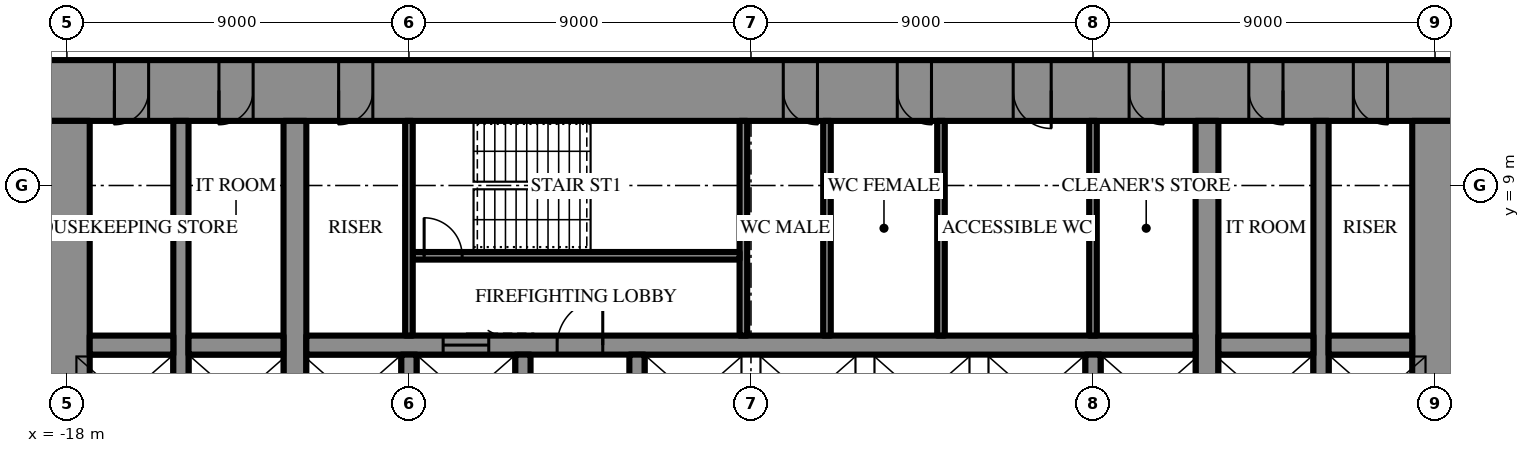
"""IFC4 building model, lengths in metres.
Left out: names, types, materials, properties, quantities, classifications, styles, units other than length and angle.
Written with IfcOpenShell. Run it as: python <this file> out.ifc"""

import sys

from ifc_helpers import new_model, si_unit, direction, frame, frame_2d, origin, place, context, subcontext, project, spatial, rectangle, extrude, element, fill, save


model = new_model("IFC4")
c1 = context("Model", 3, precision=1e-05, world=origin(), true_north=direction((0.0, 1.0)))
c2 = subcontext(c1, "Body", "Model", "MODEL_VIEW")
j1 = project(units=[si_unit("LENGTHUNIT", "METRE"), si_unit("PLANEANGLEUNIT", "RADIAN")], contexts=[c1])
p1 = place(None, origin())
s1 = spatial("IfcSite", under=j1, at=p1, CompositionType="ELEMENT")
p2 = place(p1, origin())
s2 = spatial("IfcBuilding", under=s1, at=p2, CompositionType="ELEMENT")
p3 = place(p2, frame((0.0, 0.0, 73.9)))
s3 = spatial("IfcBuildingStorey", under=s2, at=p3, CompositionType="ELEMENT", Elevation=73.9)
p4 = place(p3, frame((-18.6, 11.5, 0.0), z_axis=(0.0, 0.0, 1.0), x_axis=(1.0, 0.0, 0.0)))
e1 = element("IfcWall", 1, at=p4, inside=s3, PredefinedType="SHEAR", context=c2, shape_type="SweptSolid", body=[
    extrude(rectangle(XDim=37.2, YDim=1.6, at=frame_2d((18.6, 0.0))), origin(), (0.0, 0.0, 1.0), 4.2),
])
p5 = place(p4, frame((19.45, 0.0, 0.0)))
e2 = element("IfcOpeningElement", 2, at=p5, cuts=e1, PredefinedType="OPENING", context=c2, shape_type="SweptSolid", body=[
    extrude(rectangle(XDim=0.9, YDim=2.2, at=frame_2d((0.45, 1.1))), frame((0.0, 0.81, 0.0), z_axis=(0.0, -1.0, 0.0), x_axis=(1.0, 0.0, 0.0)), (0.0, 0.0, 1.0), 1.62),
])
p6 = place(p4, frame((22.45, 0.0, 0.0)))
e3 = element("IfcOpeningElement", 3, at=p6, cuts=e1, PredefinedType="OPENING", context=c2, shape_type="SweptSolid", body=[
    extrude(rectangle(XDim=0.9, YDim=2.2, at=frame_2d((0.45, 1.1))), frame((0.0, 0.81, 0.0), z_axis=(0.0, -1.0, 0.0), x_axis=(1.0, 0.0, 0.0)), (0.0, 0.0, 1.0), 1.62),
])
p7 = place(p4, frame((25.5, 0.0, 0.0)))
e4 = element("IfcOpeningElement", 4, at=p7, cuts=e1, PredefinedType="OPENING", context=c2, shape_type="SweptSolid", body=[
    extrude(rectangle(XDim=1.0, YDim=2.2, at=frame_2d((0.5, 1.1))), frame((0.0, 0.81, 0.0), z_axis=(0.0, -1.0, 0.0), x_axis=(1.0, 0.0, 0.0)), (0.0, 0.0, 1.0), 1.62),
])
p8 = place(p4, frame((1.85, 0.0, 0.0)))
e5 = element("IfcOpeningElement", 5, at=p8, cuts=e1, PredefinedType="OPENING", context=c2, shape_type="SweptSolid", body=[
    extrude(rectangle(XDim=0.9, YDim=2.2, at=frame_2d((0.45, 1.1))), frame((0.0, 0.81, 0.0), z_axis=(0.0, -1.0, 0.0), x_axis=(1.0, 0.0, 0.0)), (0.0, 0.0, 1.0), 1.62),
])
p9 = place(p4, frame((4.6, 0.0, 0.0)))
e6 = element("IfcOpeningElement", 6, at=p9, cuts=e1, PredefinedType="OPENING", context=c2, shape_type="SweptSolid", body=[
    extrude(rectangle(XDim=0.9, YDim=2.2, at=frame_2d((0.45, 1.1))), frame((0.0, 0.81, 0.0), z_axis=(0.0, -1.0, 0.0), x_axis=(1.0, 0.0, 0.0)), (0.0, 0.0, 1.0), 1.62),
])
p10 = place(p4, frame((7.75, 0.0, 0.0)))
e7 = element("IfcOpeningElement", 7, at=p10, cuts=e1, PredefinedType="OPENING", context=c2, shape_type="SweptSolid", body=[
    extrude(rectangle(XDim=0.9, YDim=2.2, at=frame_2d((0.45, 1.1))), frame((0.0, 0.81, 0.0), z_axis=(0.0, -1.0, 0.0), x_axis=(1.0, 0.0, 0.0)), (0.0, 0.0, 1.0), 1.62),
])
p11 = place(p4, frame((28.55, 0.0, 0.0)))
e8 = element("IfcOpeningElement", 8, at=p11, cuts=e1, PredefinedType="OPENING", context=c2, shape_type="SweptSolid", body=[
    extrude(rectangle(XDim=0.9, YDim=2.2, at=frame_2d((0.45, 1.1))), frame((0.0, 0.81, 0.0), z_axis=(0.0, -1.0, 0.0), x_axis=(1.0, 0.0, 0.0)), (0.0, 0.0, 1.0), 1.62),
])
p12 = place(p4, frame((31.7, 0.0, 0.0)))
e9 = element("IfcOpeningElement", 9, at=p12, cuts=e1, PredefinedType="OPENING", context=c2, shape_type="SweptSolid", body=[
    extrude(rectangle(XDim=0.9, YDim=2.2, at=frame_2d((0.45, 1.1))), frame((0.0, 0.81, 0.0), z_axis=(0.0, -1.0, 0.0), x_axis=(1.0, 0.0, 0.0)), (0.0, 0.0, 1.0), 1.62),
])
p13 = place(p4, frame((34.45, 0.0, 0.0)))
e10 = element("IfcOpeningElement", 10, at=p13, cuts=e1, PredefinedType="OPENING", context=c2, shape_type="SweptSolid", body=[
    extrude(rectangle(XDim=0.9, YDim=2.2, at=frame_2d((0.45, 1.1))), frame((0.0, 0.81, 0.0), z_axis=(0.0, -1.0, 0.0), x_axis=(1.0, 0.0, 0.0)), (0.0, 0.0, 1.0), 1.62),
])
p14 = place(p3, frame((18.0, -10.7, 0.0), z_axis=(0.0, 0.0, 1.0), x_axis=(0.0, 1.0, 0.0)))
e11 = element("IfcWall", 11, at=p14, inside=s3, PredefinedType="SHEAR", context=c2, shape_type="SweptSolid", body=[
    extrude(rectangle(XDim=21.4, YDim=1.2, at=frame_2d((10.7, 0.0))), origin(), (0.0, 0.0, 1.0), 4.2),
])
p15 = place(p14, frame((9.8, 0.0, 0.0)))
e12 = element("IfcOpeningElement", 12, at=p15, cuts=e11, PredefinedType="OPENING", context=c2, shape_type="SweptSolid", body=[
    extrude(rectangle(XDim=1.8, YDim=2.4, at=frame_2d((0.9, 1.2))), frame((0.0, 0.61, 0.0), z_axis=(0.0, -1.0, 0.0), x_axis=(1.0, 0.0, 0.0)), (0.0, 0.0, 1.0), 1.22),
])
p16 = place(p3, frame((-18.0, 10.7, 0.0), z_axis=(0.0, 0.0, 1.0), x_axis=(0.0, -1.0, 0.0)))
e13 = element("IfcWall", 13, at=p16, inside=s3, PredefinedType="SHEAR", context=c2, shape_type="SweptSolid", body=[
    extrude(rectangle(XDim=21.4, YDim=1.2, at=frame_2d((10.7, 0.0))), origin(), (0.0, 0.0, 1.0), 4.2),
])
p17 = place(p16, frame((9.8, 0.0, 0.0)))
e14 = element("IfcOpeningElement", 14, at=p17, cuts=e13, PredefinedType="OPENING", context=c2, shape_type="SweptSolid", body=[
    extrude(rectangle(XDim=1.8, YDim=2.4, at=frame_2d((0.9, 1.2))), frame((0.0, 0.61, 0.0), z_axis=(0.0, -1.0, 0.0), x_axis=(1.0, 0.0, 0.0)), (0.0, 0.0, 1.0), 1.22),
])
p18 = place(p3, frame((12.0, -10.7, 0.0), z_axis=(0.0, 0.0, 1.0), x_axis=(0.0, 1.0, 0.0)))
e15 = element("IfcWall", 15, at=p18, inside=s3, PredefinedType="SHEAR", context=c2, shape_type="SweptSolid", body=[
    extrude(rectangle(XDim=21.4, YDim=0.6, at=frame_2d((10.7, 0.0))), origin(), (0.0, 0.0, 1.0), 4.2),
])
p19 = place(p18, frame((9.8, 0.0, 0.0)))
e16 = element("IfcOpeningElement", 16, at=p19, cuts=e15, PredefinedType="OPENING", context=c2, shape_type="SweptSolid", body=[
    extrude(rectangle(XDim=1.8, YDim=2.4, at=frame_2d((0.9, 1.2))), frame((0.0, 0.31, 0.0), z_axis=(0.0, -1.0, 0.0), x_axis=(1.0, 0.0, 0.0)), (0.0, 0.0, 1.0), 0.62),
])
p20 = place(p3, frame((-12.0, -10.7, 0.0), z_axis=(0.0, 0.0, 1.0), x_axis=(0.0, 1.0, 0.0)))
e17 = element("IfcWall", 17, at=p20, inside=s3, PredefinedType="SHEAR", context=c2, shape_type="SweptSolid", body=[
    extrude(rectangle(XDim=21.4, YDim=0.6, at=frame_2d((10.7, 0.0))), origin(), (0.0, 0.0, 1.0), 4.2),
])
p21 = place(p20, frame((9.8, 0.0, 0.0)))
e18 = element("IfcOpeningElement", 18, at=p21, cuts=e17, PredefinedType="OPENING", context=c2, shape_type="SweptSolid", body=[
    extrude(rectangle(XDim=1.8, YDim=2.4, at=frame_2d((0.9, 1.2))), frame((0.0, 0.31, 0.0), z_axis=(0.0, -1.0, 0.0), x_axis=(1.0, 0.0, 0.0)), (0.0, 0.0, 1.0), 0.62),
])
p22 = place(p3, frame((15.0, -10.7, 0.0), z_axis=(0.0, 0.0, 1.0), x_axis=(0.0, 1.0, 0.0)))
e19 = element("IfcWall", 19, at=p22, inside=s3, PredefinedType="SHEAR", context=c2, shape_type="SweptSolid", body=[
    extrude(rectangle(XDim=21.4, YDim=0.4, at=frame_2d((10.7, 0.0))), origin(), (0.0, 0.0, 1.0), 4.2),
])
p23 = place(p22, frame((9.8, 0.0, 0.0)))
e20 = element("IfcOpeningElement", 20, at=p23, cuts=e19, PredefinedType="OPENING", context=c2, shape_type="SweptSolid", body=[
    extrude(rectangle(XDim=1.8, YDim=2.4, at=frame_2d((0.9, 1.2))), frame((0.0, 0.21, 0.0), z_axis=(0.0, -1.0, 0.0), x_axis=(1.0, 0.0, 0.0)), (0.0, 0.0, 1.0), 0.42),
])
p24 = place(p3, frame((-15.0, -10.7, 0.0), z_axis=(0.0, 0.0, 1.0), x_axis=(0.0, 1.0, 0.0)))
e21 = element("IfcWall", 21, at=p24, inside=s3, PredefinedType="SHEAR", context=c2, shape_type="SweptSolid", body=[
    extrude(rectangle(XDim=21.4, YDim=0.4, at=frame_2d((10.7, 0.0))), origin(), (0.0, 0.0, 1.0), 4.2),
])
p25 = place(p24, frame((9.8, 0.0, 0.0)))
e22 = element("IfcOpeningElement", 22, at=p25, cuts=e21, PredefinedType="OPENING", context=c2, shape_type="SweptSolid", body=[
    extrude(rectangle(XDim=1.8, YDim=2.4, at=frame_2d((0.9, 1.2))), frame((0.0, 0.21, 0.0), z_axis=(0.0, -1.0, 0.0), x_axis=(1.0, 0.0, 0.0)), (0.0, 0.0, 1.0), 0.42),
])
p26 = place(p3, frame((-17.4, 4.8, 0.0), z_axis=(0.0, 0.0, 1.0), x_axis=(1.0, 0.0, 0.0)))
e23 = element("IfcWall", 23, at=p26, inside=s3, PredefinedType="SHEAR", context=c2, shape_type="SweptSolid", body=[
    extrude(rectangle(XDim=2.2, YDim=0.5, at=frame_2d((1.1, 0.0))), origin(), (0.0, 0.0, 1.0), 4.2),
])
p27 = place(p3, frame((-14.8, 4.8, 0.0), z_axis=(0.0, 0.0, 1.0), x_axis=(1.0, 0.0, 0.0)))
e24 = element("IfcWall", 24, at=p27, inside=s3, PredefinedType="SHEAR", context=c2, shape_type="SweptSolid", body=[
    extrude(rectangle(XDim=2.5, YDim=0.5, at=frame_2d((1.25, 0.0))), origin(), (0.0, 0.0, 1.0), 4.2),
])
p28 = place(p3, frame((-11.7, 4.8, 0.0), z_axis=(0.0, 0.0, 1.0), x_axis=(1.0, 0.0, 0.0)))
e25 = element("IfcWall", 25, at=p28, inside=s3, PredefinedType="SHEAR", context=c2, shape_type="SweptSolid", body=[
    extrude(rectangle(XDim=23.4, YDim=0.5, at=frame_2d((11.7, 0.0))), origin(), (0.0, 0.0, 1.0), 4.2),
])
p29 = place(p28, frame((6.6, 0.0, 0.0)))
e26 = element("IfcOpeningElement", 26, at=p29, cuts=e25, PredefinedType="OPENING", context=c2, shape_type="SweptSolid", body=[
    extrude(rectangle(XDim=1.2, YDim=2.2, at=frame_2d((0.6, 1.1))), frame((0.0, 0.26, 0.0), z_axis=(0.0, -1.0, 0.0), x_axis=(1.0, 0.0, 0.0)), (0.0, 0.0, 1.0), 0.52),
])
p30 = place(p28, frame((3.6, 0.0, 0.0)))
e27 = element("IfcOpeningElement", 27, at=p30, cuts=e25, PredefinedType="OPENING", context=c2, shape_type="SweptSolid", body=[
    extrude(rectangle(XDim=1.2, YDim=2.2, at=frame_2d((0.6, 1.1))), frame((0.0, 0.26, 0.0), z_axis=(0.0, -1.0, 0.0), x_axis=(1.0, 0.0, 0.0)), (0.0, 0.0, 1.0), 0.52),
])
p31 = place(p3, frame((12.3, 4.8, 0.0), z_axis=(0.0, 0.0, 1.0), x_axis=(1.0, 0.0, 0.0)))
e28 = element("IfcWall", 28, at=p31, inside=s3, PredefinedType="SHEAR", context=c2, shape_type="SweptSolid", body=[
    extrude(rectangle(XDim=2.5, YDim=0.5, at=frame_2d((1.25, 0.0))), origin(), (0.0, 0.0, 1.0), 4.2),
])
p32 = place(p3, frame((15.2, 4.8, 0.0), z_axis=(0.0, 0.0, 1.0), x_axis=(1.0, 0.0, 0.0)))
e29 = element("IfcWall", 29, at=p32, inside=s3, PredefinedType="SHEAR", context=c2, shape_type="SweptSolid", body=[
    extrude(rectangle(XDim=2.2, YDim=0.5, at=frame_2d((1.1, 0.0))), origin(), (0.0, 0.0, 1.0), 4.2),
])
for number, where, z_axis, x_axis in (
    (30, (-9.0, 2.25, 0.0), (0.0, 0.0, 1.0), (0.0, 1.0, 0.0)),
    (31, (-6.0, 2.25, 0.0), (0.0, 0.0, 1.0), (0.0, 1.0, 0.0)),
    (32, (-3.0, 2.25, 0.0), (0.0, 0.0, 1.0), (0.0, 1.0, 0.0)),
    (33, (9.0, 2.25, 0.0), (0.0, 0.0, 1.0), (0.0, 1.0, 0.0)),
):
    element("IfcWall", number, at=place(p3, frame(where, z_axis=z_axis, x_axis=x_axis)), inside=s3, PredefinedType="SHEAR", context=c2, shape_type="SweptSolid", body=[
        extrude(rectangle(XDim=2.3, YDim=0.4, at=frame_2d((1.15, 0.0))), origin(), (0.0, 0.0, 1.0), 4.2),
    ])
p33 = place(p3, frame((-0.2, 5.05, 0.0), z_axis=(0.0, 0.0, 1.0), x_axis=(0.0, 1.0, 0.0)))
e34 = element("IfcWall", 34, at=p33, inside=s3, PredefinedType="SHEAR", context=c2, shape_type="SweptSolid", body=[
    extrude(rectangle(XDim=5.65, YDim=0.2, at=frame_2d((2.825, 0.0))), origin(), (0.0, 0.0, 1.0), 4.2),
])
p34 = place(p3, frame((-8.9, 7.15, 0.0), z_axis=(0.0, 0.0, 1.0), x_axis=(1.0, 0.0, 0.0)))
e35 = element("IfcWall", 35, at=p34, inside=s3, PredefinedType="SHEAR", context=c2, shape_type="SweptSolid", body=[
    extrude(rectangle(XDim=8.6, YDim=0.2, at=frame_2d((4.3, 0.0))), origin(), (0.0, 0.0, 1.0), 4.2),
])
p35 = place(p34, frame((0.3, 0.0, 0.0)))
e36 = element("IfcOpeningElement", 36, at=p35, cuts=e35, PredefinedType="OPENING", context=c2, shape_type="SweptSolid", body=[
    extrude(rectangle(XDim=1.0, YDim=2.2, at=frame_2d((0.5, 1.1))), frame((0.0, 0.11, 0.0), z_axis=(0.0, -1.0, 0.0), x_axis=(1.0, 0.0, 0.0)), (0.0, 0.0, 1.0), 0.22),
])
for number, where, z_axis, x_axis in (
    (37, (-9.0, 5.05, 0.0), (0.0, 0.0, 1.0), (0.0, 1.0, 0.0)),
    (38, (9.0, 5.05, 0.0), (0.0, 0.0, 1.0), (0.0, 1.0, 0.0)),
    (39, (2.0, 5.05, 0.0), (0.0, 0.0, 1.0), (0.0, 1.0, 0.0)),
    (40, (5.0, 5.05, 0.0), (0.0, 0.0, 1.0), (0.0, 1.0, 0.0)),
):
    element("IfcWall", number, at=place(p3, frame(where, z_axis=z_axis, x_axis=x_axis)), inside=s3, PredefinedType="PARTITIONING", context=c2, shape_type="SweptSolid", body=[
        extrude(rectangle(XDim=5.65, YDim=0.2, at=frame_2d((2.825, 0.0))), origin(), (0.0, 0.0, 1.0), 4.0),
    ])
p36 = place(p29, origin())
e41 = element("IfcDoor", 41, at=p36, inside=s3, OperationType="SINGLE_SWING_LEFT", PredefinedType="DOOR", context=c2, shape_type="SweptSolid", body=[
    extrude(rectangle(XDim=1.2, YDim=2.2, at=frame_2d((0.6, 1.1))), frame((0.0, 0.025, 0.0), z_axis=(0.0, -1.0, 0.0), x_axis=(1.0, 0.0, 0.0)), (0.0, 0.0, 1.0), 0.05),
])
fill(e26, e41)
p37 = place(p35, origin())
e42 = element("IfcDoor", 42, at=p37, inside=s3, OperationType="SINGLE_SWING_RIGHT", PredefinedType="DOOR", context=c2, shape_type="SweptSolid", body=[
    extrude(rectangle(XDim=1.0, YDim=2.2, at=frame_2d((0.5, 1.1))), frame((0.0, 0.025, 0.0), z_axis=(0.0, -1.0, 0.0), x_axis=(1.0, 0.0, 0.0)), (0.0, 0.0, 1.0), 0.05),
])
fill(e36, e42)
p38 = place(p5, frame((0.9, 0.0, 0.0), z_axis=(0.0, 0.0, 1.0), x_axis=(-1.0, 0.0, 0.0)))
e43 = element("IfcDoor", 43, at=p38, inside=s3, OperationType="SINGLE_SWING_RIGHT", PredefinedType="DOOR", context=c2, shape_type="SweptSolid", body=[
    extrude(rectangle(XDim=0.9, YDim=2.2, at=frame_2d((0.45, 1.1))), frame((0.0, 0.025, 0.0), z_axis=(0.0, -1.0, 0.0), x_axis=(1.0, 0.0, 0.0)), (0.0, 0.0, 1.0), 0.05),
])
fill(e2, e43)
p39 = place(p6, frame((0.9, 0.0, 0.0), z_axis=(0.0, 0.0, 1.0), x_axis=(-1.0, 0.0, 0.0)))
e44 = element("IfcDoor", 44, at=p39, inside=s3, OperationType="SINGLE_SWING_RIGHT", PredefinedType="DOOR", context=c2, shape_type="SweptSolid", body=[
    extrude(rectangle(XDim=0.9, YDim=2.2, at=frame_2d((0.45, 1.1))), frame((0.0, 0.025, 0.0), z_axis=(0.0, -1.0, 0.0), x_axis=(1.0, 0.0, 0.0)), (0.0, 0.0, 1.0), 0.05),
])
fill(e3, e44)
p40 = place(p7, frame((1.0, 0.0, 0.0), z_axis=(0.0, 0.0, 1.0), x_axis=(-1.0, 0.0, 0.0)))
e45 = element("IfcDoor", 45, at=p40, inside=s3, OperationType="SINGLE_SWING_RIGHT", PredefinedType="DOOR", context=c2, shape_type="SweptSolid", body=[
    extrude(rectangle(XDim=1.0, YDim=2.2, at=frame_2d((0.5, 1.1))), frame((0.0, 0.025, 0.0), z_axis=(0.0, -1.0, 0.0), x_axis=(1.0, 0.0, 0.0)), (0.0, 0.0, 1.0), 0.05),
])
fill(e4, e45)
p41 = place(p8, frame((0.9, 0.0, 0.0), z_axis=(0.0, 0.0, 1.0), x_axis=(-1.0, 0.0, 0.0)))
e46 = element("IfcDoor", 46, at=p41, inside=s3, OperationType="SINGLE_SWING_LEFT", PredefinedType="DOOR", context=c2, shape_type="SweptSolid", body=[
    extrude(rectangle(XDim=0.9, YDim=2.2, at=frame_2d((0.45, 1.1))), frame((0.0, 0.025, 0.0), z_axis=(0.0, -1.0, 0.0), x_axis=(1.0, 0.0, 0.0)), (0.0, 0.0, 1.0), 0.05),
])
fill(e5, e46)
p42 = place(p9, frame((0.9, 0.0, 0.0), z_axis=(0.0, 0.0, 1.0), x_axis=(-1.0, 0.0, 0.0)))
e47 = element("IfcDoor", 47, at=p42, inside=s3, OperationType="SINGLE_SWING_LEFT", PredefinedType="DOOR", context=c2, shape_type="SweptSolid", body=[
    extrude(rectangle(XDim=0.9, YDim=2.2, at=frame_2d((0.45, 1.1))), frame((0.0, 0.025, 0.0), z_axis=(0.0, -1.0, 0.0), x_axis=(1.0, 0.0, 0.0)), (0.0, 0.0, 1.0), 0.05),
])
fill(e6, e47)
p43 = place(p10, frame((0.9, 0.0, 0.0), z_axis=(0.0, 0.0, 1.0), x_axis=(-1.0, 0.0, 0.0)))
e48 = element("IfcDoor", 48, at=p43, inside=s3, OperationType="SINGLE_SWING_LEFT", PredefinedType="DOOR", context=c2, shape_type="SweptSolid", body=[
    extrude(rectangle(XDim=0.9, YDim=2.2, at=frame_2d((0.45, 1.1))), frame((0.0, 0.025, 0.0), z_axis=(0.0, -1.0, 0.0), x_axis=(1.0, 0.0, 0.0)), (0.0, 0.0, 1.0), 0.05),
])
fill(e7, e48)
p44 = place(p11, frame((0.9, 0.0, 0.0), z_axis=(0.0, 0.0, 1.0), x_axis=(-1.0, 0.0, 0.0)))
e49 = element("IfcDoor", 49, at=p44, inside=s3, OperationType="SINGLE_SWING_RIGHT", PredefinedType="DOOR", context=c2, shape_type="SweptSolid", body=[
    extrude(rectangle(XDim=0.9, YDim=2.2, at=frame_2d((0.45, 1.1))), frame((0.0, 0.025, 0.0), z_axis=(0.0, -1.0, 0.0), x_axis=(1.0, 0.0, 0.0)), (0.0, 0.0, 1.0), 0.05),
])
fill(e8, e49)
p45 = place(p12, frame((0.9, 0.0, 0.0), z_axis=(0.0, 0.0, 1.0), x_axis=(-1.0, 0.0, 0.0)))
e50 = element("IfcDoor", 50, at=p45, inside=s3, OperationType="SINGLE_SWING_RIGHT", PredefinedType="DOOR", context=c2, shape_type="SweptSolid", body=[
    extrude(rectangle(XDim=0.9, YDim=2.2, at=frame_2d((0.45, 1.1))), frame((0.0, 0.025, 0.0), z_axis=(0.0, -1.0, 0.0), x_axis=(1.0, 0.0, 0.0)), (0.0, 0.0, 1.0), 0.05),
])
fill(e9, e50)
p46 = place(p13, frame((0.9, 0.0, 0.0), z_axis=(0.0, 0.0, 1.0), x_axis=(-1.0, 0.0, 0.0)))
e51 = element("IfcDoor", 51, at=p46, inside=s3, OperationType="SINGLE_SWING_RIGHT", PredefinedType="DOOR", context=c2, shape_type="SweptSolid", body=[
    extrude(rectangle(XDim=0.9, YDim=2.2, at=frame_2d((0.45, 1.1))), frame((0.0, 0.025, 0.0), z_axis=(0.0, -1.0, 0.0), x_axis=(1.0, 0.0, 0.0)), (0.0, 0.0, 1.0), 0.05),
])
fill(e10, e51)
p47 = place(p30, origin())
e52 = element("IfcDoor", 52, at=p47, inside=s3, OperationType="SLIDING_TO_LEFT", PredefinedType="DOOR", context=c2, shape_type="SweptSolid", body=[
    extrude(rectangle(XDim=1.2, YDim=2.2, at=frame_2d((0.6, 1.1))), frame((0.0, 0.025, 0.0), z_axis=(0.0, -1.0, 0.0), x_axis=(1.0, 0.0, 0.0)), (0.0, 0.0, 1.0), 0.05),
])
fill(e27, e52)
save(model, sys.argv[1])
